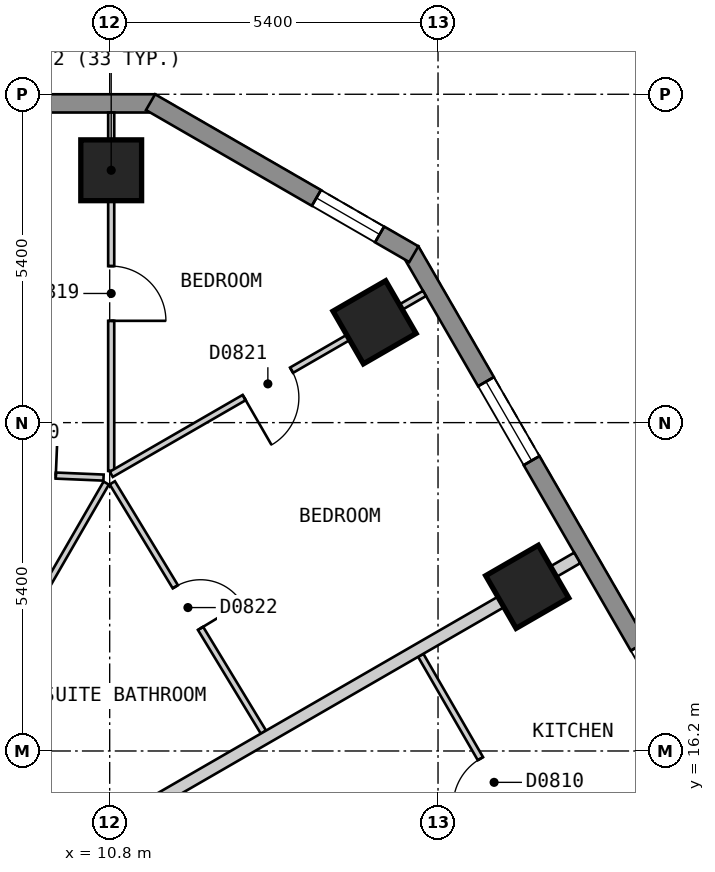
"""IFC4 building model, lengths in metres.
Left out: names, types, materials, properties, quantities, classifications, styles, units other than length and angle.
Written with IfcOpenShell. Run it as: python <this file> out.ifc"""

import sys

from ifc_helpers import new_model, si_unit, direction, frame, frame_2d, origin, origin_2d, place, context, subcontext, project, spatial, polyline, rectangle, outline, extrude, element, fill, save


model = new_model("IFC4")
c1 = context("Model", 3, precision=1e-05, world=origin(), true_north=direction((0.0, 1.0)))
c2 = subcontext(c1, "Body", "Model", "MODEL_VIEW")
j1 = project(units=[si_unit("LENGTHUNIT", "METRE"), si_unit("PLANEANGLEUNIT", "RADIAN")], contexts=[c1])
p1 = place(None, origin())
s1 = spatial("IfcSite", under=j1, at=p1, CompositionType="ELEMENT")
p2 = place(p1, origin())
s2 = spatial("IfcBuilding", under=s1, at=p2, CompositionType="ELEMENT")
p3 = place(p2, frame((0.0, 0.0, 72.0)))
s3 = spatial("IfcBuildingStorey", under=s2, at=p3, CompositionType="ELEMENT", Elevation=72.0)
for number, where, z_axis, x_axis in (
    (1, (10.825, 25.75, 0.0), (0.0, 0.0, 1.0), (-1.0, 0.0, 0.0)),
    (2, (17.667, 18.9, 0.0), (0.0, 0.0, 1.0), (-0.5, 0.866, 0.0)),
    (3, (15.156, 23.25, 0.0), (0.0, 0.0, 1.0), (-0.5, 0.866, 0.0)),
):
    element("IfcColumn", number, at=place(p3, frame(where, z_axis=z_axis, x_axis=x_axis)), inside=s3, PredefinedType="COLUMN", context=c2, shape_type="SweptSolid", body=[
        extrude(rectangle(XDim=1.0, YDim=1.0, at=origin_2d()), origin(), (0.0, 0.0, 1.0), 3.0),
    ])
p4 = place(p3, frame((11.547, 26.85, 0.0), z_axis=(0.0, 0.0, 1.0), x_axis=(-1.0, 0.0, 0.0)))
e4 = element("IfcWall", 4, at=p4, inside=s3, PredefinedType="SOLIDWALL", context=c2, shape_type="SweptSolid", body=[
    extrude(outline(polyline([(0.0, -0.15), (23.094, -0.15), (23.014, 0.15), (0.08, 0.15), (0.0, -0.15)])), origin(), (0.0, 0.0, 1.0), 2.7),
])
p5 = place(p4, frame((2.678, 0.0, 0.15)))
e5 = element("IfcOpeningElement", 5, at=p5, cuts=e4, PredefinedType="OPENING", context=c2, shape_type="SweptSolid", body=[
    extrude(rectangle(XDim=1.5, YDim=2.1, at=frame_2d((0.75, 1.05))), frame((0.0, 0.16, 0.0), z_axis=(0.0, -1.0, 0.0), x_axis=(1.0, 0.0, 0.0)), (0.0, 0.0, 1.0), 0.32),
])
p6 = place(p4, frame((8.092, 0.0, 0.15)))
e6 = element("IfcOpeningElement", 6, at=p6, cuts=e4, PredefinedType="OPENING", context=c2, shape_type="SweptSolid", body=[
    extrude(rectangle(XDim=1.5, YDim=2.1, at=frame_2d((0.75, 1.05))), frame((0.0, 0.16, 0.0), z_axis=(0.0, -1.0, 0.0), x_axis=(1.0, 0.0, 0.0)), (0.0, 0.0, 1.0), 0.32),
])
p7 = place(p4, frame((13.504, 0.0, 0.15)))
e7 = element("IfcOpeningElement", 7, at=p7, cuts=e4, PredefinedType="OPENING", context=c2, shape_type="SweptSolid", body=[
    extrude(rectangle(XDim=1.5, YDim=2.1, at=frame_2d((0.75, 1.05))), frame((0.0, 0.16, 0.0), z_axis=(0.0, -1.0, 0.0), x_axis=(1.0, 0.0, 0.0)), (0.0, 0.0, 1.0), 0.32),
])
p8 = place(p4, frame((18.917, 0.0, 0.15)))
e8 = element("IfcOpeningElement", 8, at=p8, cuts=e4, PredefinedType="OPENING", context=c2, shape_type="SweptSolid", body=[
    extrude(rectangle(XDim=1.5, YDim=2.1, at=frame_2d((0.75, 1.05))), frame((0.0, 0.16, 0.0), z_axis=(0.0, -1.0, 0.0), x_axis=(1.0, 0.0, 0.0)), (0.0, 0.0, 1.0), 0.32),
])
p9 = place(p3, frame((29.027, 1.425, 0.0), z_axis=(0.0, 0.0, 1.0), x_axis=(-0.500027479704, 0.866009537788, 0.0)))
e9 = element("IfcWall", 9, at=p9, inside=s3, PredefinedType="SOLIDWALL", context=c2, shape_type="SweptSolid", body=[
    extrude(outline(polyline([(0.0, -0.15), (26.559, -0.15), (26.478, 0.15), (0.08, 0.15), (0.0, -0.15)])), origin(), (0.0, 0.0, 1.0), 2.7),
])
p10 = place(p9, frame((2.483, 0.0, 0.15)))
e10 = element("IfcOpeningElement", 10, at=p10, cuts=e9, PredefinedType="OPENING", context=c2, shape_type="SweptSolid", body=[
    extrude(rectangle(XDim=1.5, YDim=2.1, at=frame_2d((0.75, 1.05))), frame((0.0, 0.16, 0.0), z_axis=(0.0, -1.0, 0.0), x_axis=(1.0, 0.0, 0.0)), (0.0, 0.0, 1.0), 0.32),
])
p11 = place(p9, frame((7.506, 0.0, 0.15)))
e11 = element("IfcOpeningElement", 11, at=p11, cuts=e9, PredefinedType="OPENING", context=c2, shape_type="SweptSolid", body=[
    extrude(rectangle(XDim=1.5, YDim=2.1, at=frame_2d((0.75, 1.05))), frame((0.0, 0.16, 0.0), z_axis=(0.0, -1.0, 0.0), x_axis=(1.0, 0.0, 0.0)), (0.0, 0.0, 1.0), 0.32),
])
p12 = place(p9, frame((12.529, 0.0, 0.15)))
e12 = element("IfcOpeningElement", 12, at=p12, cuts=e9, PredefinedType="OPENING", context=c2, shape_type="SweptSolid", body=[
    extrude(rectangle(XDim=1.5, YDim=2.1, at=frame_2d((0.75, 1.05))), frame((0.0, 0.16, 0.0), z_axis=(0.0, -1.0, 0.0), x_axis=(1.0, 0.0, 0.0)), (0.0, 0.0, 1.0), 0.32),
])
p13 = place(p9, frame((17.552, 0.0, 0.15)))
e13 = element("IfcOpeningElement", 13, at=p13, cuts=e9, PredefinedType="OPENING", context=c2, shape_type="SweptSolid", body=[
    extrude(rectangle(XDim=1.5, YDim=2.1, at=frame_2d((0.75, 1.05))), frame((0.0, 0.16, 0.0), z_axis=(0.0, -1.0, 0.0), x_axis=(1.0, 0.0, 0.0)), (0.0, 0.0, 1.0), 0.32),
])
p14 = place(p9, frame((22.575, 0.0, 0.15)))
e14 = element("IfcOpeningElement", 14, at=p14, cuts=e9, PredefinedType="OPENING", context=c2, shape_type="SweptSolid", body=[
    extrude(rectangle(XDim=1.5, YDim=2.1, at=frame_2d((0.75, 1.05))), frame((0.0, 0.16, 0.0), z_axis=(0.0, -1.0, 0.0), x_axis=(1.0, 0.0, 0.0)), (0.0, 0.0, 1.0), 0.32),
])
p15 = place(p3, frame((15.802, 24.37, 0.0), z_axis=(0.0, 0.0, 1.0), x_axis=(-0.866022959057, 0.500004234368, 0.0)))
e15 = element("IfcWall", 15, at=p15, inside=s3, PredefinedType="SOLIDWALL", context=c2, shape_type="SweptSolid", body=[
    extrude(outline(polyline([(0.0, -0.15), (5.0, -0.15), (4.92, 0.15), (0.08, 0.15), (0.0, -0.15)])), origin(), (0.0, 0.0, 1.0), 2.7),
])
p16 = place(p15, frame((0.65, 0.0, 0.15)))
e16 = element("IfcOpeningElement", 16, at=p16, cuts=e15, PredefinedType="OPENING", context=c2, shape_type="SweptSolid", body=[
    extrude(rectangle(XDim=1.2, YDim=2.1, at=frame_2d((0.6, 1.05))), frame((0.0, 0.16, 0.0), z_axis=(0.0, -1.0, 0.0), x_axis=(1.0, 0.0, 0.0)), (0.0, 0.0, 1.0), 0.32),
])
p17 = place(p3, frame((8.488, 16.5, 0.0), z_axis=(0.0, 0.0, 1.0), x_axis=(0.499986836607, -0.86603300354, 0.0)))
e17 = element("IfcWall", 17, at=p17, inside=s3, PredefinedType="PARTITIONING", context=c2, shape_type="SweptSolid", body=[
    extrude(rectangle(XDim=20.09, YDim=0.2, at=frame_2d((10.045, 0.0))), origin(), (0.0, 0.0, 1.0), 2.7),
])
p18 = place(p17, frame((4.523, 0.0, 0.0)))
e18 = element("IfcOpeningElement", 18, at=p18, cuts=e17, PredefinedType="OPENING", context=c2, shape_type="SweptSolid", body=[
    extrude(rectangle(XDim=1.0, YDim=2.1, at=frame_2d((0.5, 1.05))), frame((0.0, 0.11, 0.0), z_axis=(0.0, -1.0, 0.0), x_axis=(1.0, 0.0, 0.0)), (0.0, 0.0, 1.0), 0.22),
])
p19 = place(p3, frame((10.843, 20.61, 0.0), z_axis=(0.0, 0.0, 1.0), x_axis=(0.518481125811, -0.855089072657, 0.0)))
e19 = element("IfcWall", 19, at=p19, inside=s3, PredefinedType="PARTITIONING", context=c2, shape_type="SweptSolid", body=[
    extrude(rectangle(XDim=4.795, YDim=0.1, at=frame_2d((2.397, 0.0))), origin(), (0.0, 0.0, 1.0), 2.7),
])
p20 = place(p19, frame((1.999, 0.0, 0.0)))
e20 = element("IfcOpeningElement", 20, at=p20, cuts=e19, PredefinedType="OPENING", context=c2, shape_type="SweptSolid", body=[
    extrude(rectangle(XDim=0.8, YDim=2.1, at=frame_2d((0.4, 1.05))), frame((0.0, 0.06, 0.0), z_axis=(0.0, -1.0, 0.0), x_axis=(1.0, 0.0, 0.0)), (0.0, 0.0, 1.0), 0.12),
])
p21 = place(p3, frame((15.916, 17.773, 0.0), z_axis=(0.0, 0.0, 1.0), x_axis=(0.500093956194, -0.865971151354, 0.0)))
e21 = element("IfcWall", 21, at=p21, inside=s3, PredefinedType="PARTITIONING", context=c2, shape_type="SweptSolid", body=[
    extrude(rectangle(XDim=4.873, YDim=0.1, at=frame_2d((2.437, 0.0))), origin(), (0.0, 0.0, 1.0), 2.7),
])
p22 = place(p21, frame((1.962, 0.0, 0.0)))
e22 = element("IfcOpeningElement", 22, at=p22, cuts=e21, PredefinedType="OPENING", context=c2, shape_type="SweptSolid", body=[
    extrude(rectangle(XDim=0.9, YDim=2.1, at=frame_2d((0.45, 1.05))), frame((0.0, 0.06, 0.0), z_axis=(0.0, -1.0, 0.0), x_axis=(1.0, 0.0, 0.0)), (0.0, 0.0, 1.0), 0.12),
])
p23 = place(p3, frame((8.235, 20.8, 0.0), z_axis=(0.0, 0.0, 1.0), x_axis=(0.999110277005, -0.042174096116, 0.0)))
e23 = element("IfcWall", 23, at=p23, inside=s3, PredefinedType="PARTITIONING", context=c2, shape_type="SweptSolid", body=[
    extrude(rectangle(XDim=2.466, YDim=0.1, at=frame_2d((1.233, 0.0))), origin(), (0.0, 0.0, 1.0), 2.7),
])
p24 = place(p23, frame((0.88, 0.0, 0.0)))
e24 = element("IfcOpeningElement", 24, at=p24, cuts=e23, PredefinedType="OPENING", context=c2, shape_type="SweptSolid", body=[
    extrude(rectangle(XDim=0.8, YDim=2.1, at=frame_2d((0.4, 1.05))), frame((0.0, 0.06, 0.0), z_axis=(0.0, -1.0, 0.0), x_axis=(1.0, 0.0, 0.0)), (0.0, 0.0, 1.0), 0.12),
])
p25 = place(p3, frame((8.43, 16.6, 0.0), z_axis=(0.0, 0.0, 1.0), x_axis=(0.50003312339, 0.866006279142, 0.0)))
e25 = element("IfcWall", 25, at=p25, inside=s3, PredefinedType="PARTITIONING", context=c2, shape_type="SweptSolid", body=[
    extrude(rectangle(XDim=4.626, YDim=0.1, at=frame_2d((2.313, 0.0))), origin(), (0.0, 0.0, 1.0), 2.7),
])
p26 = place(p3, frame((10.825, 20.806, 0.0), z_axis=(0.0, 0.0, 1.0), x_axis=(0.0, 1.0, 0.0)))
e26 = element("IfcWall", 26, at=p26, inside=s3, PredefinedType="PARTITIONING", context=c2, shape_type="SweptSolid", body=[
    extrude(rectangle(XDim=5.894, YDim=0.1, at=frame_2d((2.947, 0.0))), origin(), (0.0, 0.0, 1.0), 2.7),
])
p27 = place(p26, frame((2.468, 0.0, 0.0)))
e27 = element("IfcOpeningElement", 27, at=p27, cuts=e26, PredefinedType="OPENING", context=c2, shape_type="SweptSolid", body=[
    extrude(rectangle(XDim=0.9, YDim=2.1, at=frame_2d((0.45, 1.05))), frame((0.0, 0.06, 0.0), z_axis=(0.0, -1.0, 0.0), x_axis=(1.0, 0.0, 0.0)), (0.0, 0.0, 1.0), 0.12),
])
p28 = place(p3, frame((10.826, 20.75, 0.0), z_axis=(0.0, 0.0, 1.0), x_axis=(0.865986712877, 0.50006700863, 0.0)))
e28 = element("IfcWall", 28, at=p28, inside=s3, PredefinedType="PARTITIONING", context=c2, shape_type="SweptSolid", body=[
    extrude(rectangle(XDim=5.949, YDim=0.1, at=frame_2d((2.975, 0.0))), origin(), (0.0, 0.0, 1.0), 2.7),
])
p29 = place(p28, frame((2.524, 0.0, 0.0)))
e29 = element("IfcOpeningElement", 29, at=p29, cuts=e28, PredefinedType="OPENING", context=c2, shape_type="SweptSolid", body=[
    extrude(rectangle(XDim=0.9, YDim=2.1, at=frame_2d((0.45, 1.05))), frame((0.0, 0.06, 0.0), z_axis=(0.0, -1.0, 0.0), x_axis=(1.0, 0.0, 0.0)), (0.0, 0.0, 1.0), 0.12),
])
p30 = place(p3, frame((9.83, 14.375, 0.0), z_axis=(0.0, 0.0, 1.0), x_axis=(0.865992435864, 0.500057097767, 0.0)))
e30 = element("IfcWall", 30, at=p30, inside=s3, PredefinedType="PARTITIONING", context=c2, shape_type="SweptSolid", body=[
    extrude(rectangle(XDim=9.999, YDim=0.2, at=frame_2d((5.0, 0.0))), origin(), (0.0, 0.0, 1.0), 2.7),
])
p31 = place(p14, origin())
e31 = element("IfcWindow", 31, at=p31, inside=s3, PartitioningType="SINGLE_PANEL", PredefinedType="WINDOW", context=c2, shape_type="SweptSolid", body=[
    extrude(rectangle(XDim=1.5, YDim=2.1, at=frame_2d((0.75, 1.05))), frame((0.0, 0.03, 0.0), z_axis=(0.0, -1.0, 0.0), x_axis=(1.0, 0.0, 0.0)), (0.0, 0.0, 1.0), 0.06),
])
fill(e14, e31)
p32 = place(p16, origin())
e32 = element("IfcWindow", 32, at=p32, inside=s3, PartitioningType="SINGLE_PANEL", PredefinedType="WINDOW", context=c2, shape_type="SweptSolid", body=[
    extrude(rectangle(XDim=1.2, YDim=2.1, at=frame_2d((0.6, 1.05))), frame((0.0, 0.03, 0.0), z_axis=(0.0, -1.0, 0.0), x_axis=(1.0, 0.0, 0.0)), (0.0, 0.0, 1.0), 0.06),
])
fill(e16, e32)
p33 = place(p22, origin())
e33 = element("IfcDoor", 33, at=p33, inside=s3, OperationType="SINGLE_SWING_RIGHT", PredefinedType="DOOR", context=c2, shape_type="SweptSolid", body=[
    extrude(rectangle(XDim=0.9, YDim=2.1, at=frame_2d((0.45, 1.05))), frame((0.0, 0.025, 0.0), z_axis=(0.0, -1.0, 0.0), x_axis=(1.0, 0.0, 0.0)), (0.0, 0.0, 1.0), 0.05),
])
fill(e22, e33)
p34 = place(p27, origin())
e34 = element("IfcDoor", 34, at=p34, inside=s3, OperationType="SINGLE_SWING_LEFT", PredefinedType="DOOR", context=c2, shape_type="SweptSolid", body=[
    extrude(rectangle(XDim=0.9, YDim=2.1, at=frame_2d((0.45, 1.05))), frame((0.0, 0.025, 0.0), z_axis=(0.0, -1.0, 0.0), x_axis=(1.0, 0.0, 0.0)), (0.0, 0.0, 1.0), 0.05),
])
fill(e27, e34)
p35 = place(p24, origin())
e35 = element("IfcDoor", 35, at=p35, inside=s3, OperationType="SINGLE_SWING_RIGHT", PredefinedType="DOOR", context=c2, shape_type="SweptSolid", body=[
    extrude(rectangle(XDim=0.8, YDim=2.1, at=frame_2d((0.4, 1.05))), frame((0.0, 0.025, 0.0), z_axis=(0.0, -1.0, 0.0), x_axis=(1.0, 0.0, 0.0)), (0.0, 0.0, 1.0), 0.05),
])
fill(e24, e35)
p36 = place(p29, origin())
e36 = element("IfcDoor", 36, at=p36, inside=s3, OperationType="SINGLE_SWING_LEFT", PredefinedType="DOOR", context=c2, shape_type="SweptSolid", body=[
    extrude(rectangle(XDim=0.9, YDim=2.1, at=frame_2d((0.45, 1.05))), frame((0.0, 0.025, 0.0), z_axis=(0.0, -1.0, 0.0), x_axis=(1.0, 0.0, 0.0)), (0.0, 0.0, 1.0), 0.05),
])
fill(e29, e36)
p37 = place(p20, origin())
e37 = element("IfcDoor", 37, at=p37, inside=s3, OperationType="SINGLE_SWING_RIGHT", PredefinedType="DOOR", context=c2, shape_type="SweptSolid", body=[
    extrude(rectangle(XDim=0.8, YDim=2.1, at=frame_2d((0.4, 1.05))), frame((0.0, 0.025, 0.0), z_axis=(0.0, -1.0, 0.0), x_axis=(1.0, 0.0, 0.0)), (0.0, 0.0, 1.0), 0.05),
])
fill(e20, e37)
save(model, sys.argv[1])
